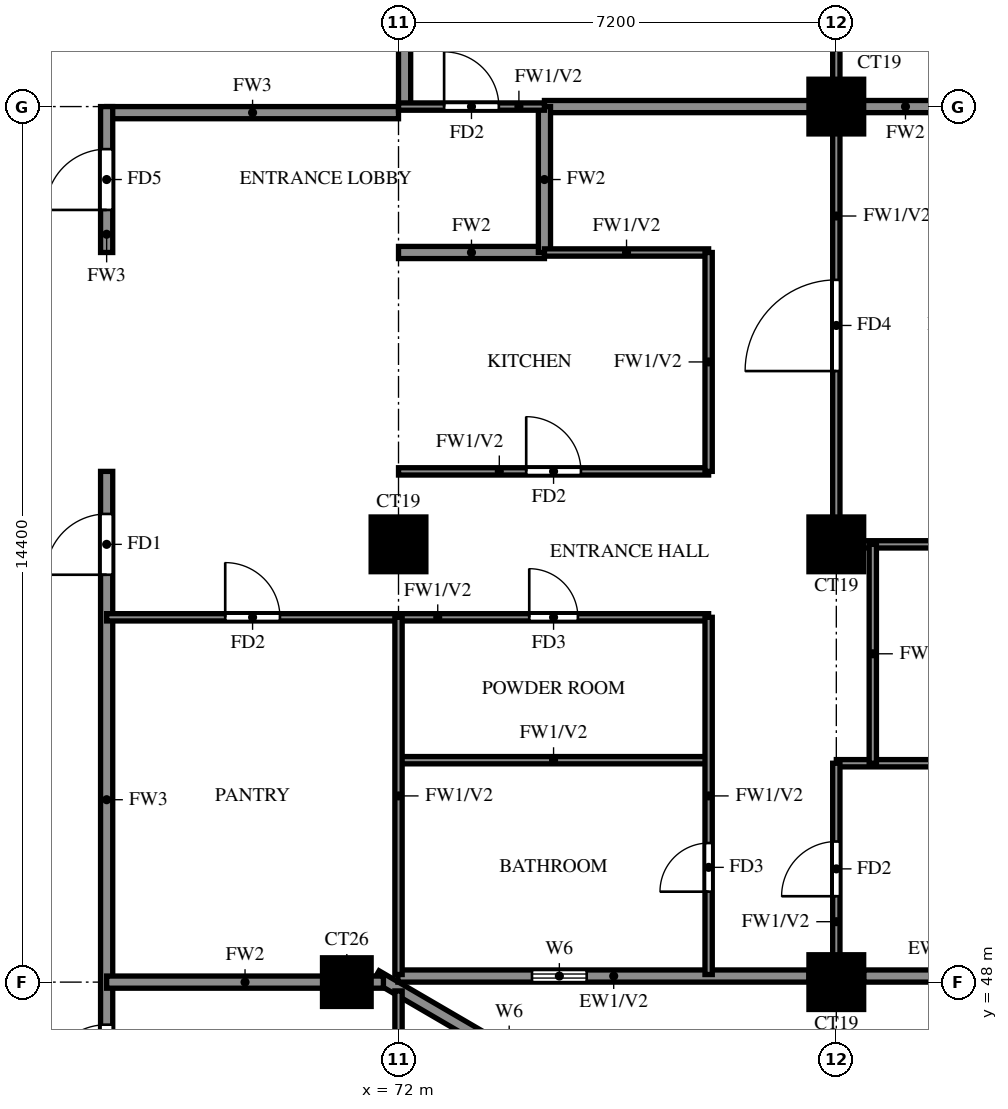
"""IFC4 building model, lengths in metres.
Left out: names, types, materials, properties, quantities, classifications, styles, units other than length and angle.
Written with IfcOpenShell. Run it as: python <this file> out.ifc"""

import sys

from ifc_helpers import new_model, si_unit, direction, frame, frame_2d, origin, origin_2d, place, context, subcontext, project, spatial, rectangle, extrude, source, transform, mapped, element, fill, save


model = new_model("IFC4")
c1 = context("Model", 3, precision=1e-05, world=origin(), true_north=direction((0.0, 1.0)))
c2 = subcontext(c1, "Body", "Model", "MODEL_VIEW")
j1 = project(units=[si_unit("LENGTHUNIT", "METRE"), si_unit("PLANEANGLEUNIT", "RADIAN")], contexts=[c1])
p1 = place(None, origin())
s1 = spatial("IfcSite", under=j1, at=p1, CompositionType="ELEMENT")
p2 = place(p1, origin())
s2 = spatial("IfcBuilding", under=s1, at=p2, CompositionType="ELEMENT")
p3 = place(p2, frame((0.0, 0.0, 199.0)))
s3 = spatial("IfcBuildingStorey", under=s2, at=p3, CompositionType="ELEMENT", Elevation=199.0)
m1 = source(origin(), c2, "Body", "SweptSolid", [
    extrude(rectangle(XDim=0.8, YDim=0.8, at=origin_2d()), origin(), (0.0, 0.0, 1.0), 3.2),
])
p4 = place(p3, frame((71.15, 48.0, 0.0), z_axis=(0.0, 0.0, 1.0), x_axis=(1.0, 0.0, 0.0)))
e1 = element("IfcColumn", 1, at=p4, inside=s3, PredefinedType="COLUMN", context=c2, shape_type="MappedRepresentation", body=[
    mapped(m1, transform((0.0, 0.0, 0.0))),
])
m2 = source(origin(), c2, "Body", "SweptSolid", [
    extrude(rectangle(XDim=0.9, YDim=0.9, at=origin_2d()), origin(), (0.0, 0.0, 1.0), 3.2),
])
for number, where, z_axis, x_axis in (
    (2, (79.2, 48.0, 0.0), (0.0, 0.0, 1.0), (1.0, 0.0, 0.0)),
    (3, (72.0, 55.2, 0.0), (0.0, 0.0, 1.0), (1.0, 0.0, 0.0)),
    (4, (79.2, 55.2, 0.0), (0.0, 0.0, 1.0), (1.0, 0.0, 0.0)),
    (5, (79.2, 62.4, 0.0), (0.0, 0.0, 1.0), (1.0, 0.0, 0.0)),
):
    element("IfcColumn", number, at=place(p3, frame(where, z_axis=z_axis, x_axis=x_axis)), inside=s3, PredefinedType="COLUMN", context=c2, shape_type="MappedRepresentation", body=[
        mapped(m2, transform((0.0, 0.0, 0.0))),
    ])
p5 = place(p3, frame((85.719, 39.881, 0.0), z_axis=(0.0, 0.0, 1.0), x_axis=(-0.86377618652, 0.503875678716, 0.0)))
e6 = element("IfcWall", 6, at=p5, inside=s3, PredefinedType="SOLIDWALL", context=c2, shape_type="SweptSolid", body=[
    extrude(rectangle(XDim=16.311, YDim=0.2, at=frame_2d((8.156, 0.0))), origin(), (0.0, 0.0, 1.0), 3.2),
])
p6 = place(p5, frame((13.326, 0.0, 1.5)))
e7 = element("IfcOpeningElement", 7, at=p6, cuts=e6, PredefinedType="OPENING", context=c2, shape_type="SweptSolid", body=[
    extrude(rectangle(XDim=0.9, YDim=0.9, at=frame_2d((0.45, 0.45))), frame((0.0, 0.11, 0.0), z_axis=(0.0, -1.0, 0.0), x_axis=(1.0, 0.0, 0.0)), (0.0, 0.0, 1.0), 0.22),
])
p7 = place(p3, frame((71.99, 48.1, 0.0), z_axis=(0.0, 0.0, 1.0), x_axis=(1.0, 0.0, 0.0)))
e8 = element("IfcWall", 8, at=p7, inside=s3, PredefinedType="SOLIDWALL", context=c2, shape_type="SweptSolid", body=[
    extrude(rectangle(XDim=6.76, YDim=0.2, at=frame_2d((3.38, 0.0))), origin(), (0.0, 0.0, 1.0), 3.2),
])
p8 = place(p7, frame((2.205, 0.0, 1.5)))
e9 = element("IfcOpeningElement", 9, at=p8, cuts=e8, PredefinedType="OPENING", context=c2, shape_type="SweptSolid", body=[
    extrude(rectangle(XDim=0.9, YDim=0.9, at=frame_2d((0.45, 0.45))), frame((0.0, 0.11, 0.0), z_axis=(0.0, -1.0, 0.0), x_axis=(1.0, 0.0, 0.0)), (0.0, 0.0, 1.0), 0.22),
])
p9 = place(p3, frame((79.65, 48.1, 0.0), z_axis=(0.0, 0.0, 1.0), x_axis=(1.0, 0.0, 0.0)))
e10 = element("IfcWall", 10, at=p9, inside=s3, PredefinedType="SOLIDWALL", context=c2, shape_type="SweptSolid", body=[
    extrude(rectangle(XDim=5.75, YDim=0.2, at=frame_2d((2.875, 0.0))), origin(), (0.0, 0.0, 1.0), 3.2),
])
p10 = place(p9, frame((1.675, 0.0, 0.6)))
e11 = element("IfcOpeningElement", 11, at=p10, cuts=e10, PredefinedType="OPENING", context=c2, shape_type="SweptSolid", body=[
    extrude(rectangle(XDim=2.4, YDim=2.4, at=frame_2d((1.2, 1.2))), frame((0.0, 0.11, 0.0), z_axis=(0.0, -1.0, 0.0), x_axis=(1.0, 0.0, 0.0)), (0.0, 0.0, 1.0), 0.22),
])
p11 = place(p3, frame((67.2, 62.3, 0.0), z_axis=(0.0, 0.0, 1.0), x_axis=(1.0, 0.0, 0.0)))
e12 = element("IfcWall", 12, at=p11, inside=s3, PredefinedType="SOLIDWALL", context=c2, shape_type="SweptSolid", body=[
    extrude(rectangle(XDim=4.8, YDim=0.2, at=frame_2d((2.4, 0.0))), origin(), (0.0, 0.0, 1.0), 3.2),
])
p12 = place(p3, frame((67.2, 45.6, 0.0), z_axis=(0.0, 0.0, 1.0), x_axis=(0.0, 1.0, 0.0)))
e13 = element("IfcWall", 13, at=p12, inside=s3, PredefinedType="SOLIDWALL", context=c2, shape_type="SweptSolid", body=[
    extrude(rectangle(XDim=10.8, YDim=0.2, at=frame_2d((5.4, 0.0))), origin(), (0.0, 0.0, 1.0), 3.2),
])
p13 = place(p12, frame((9.1, 0.0, 0.0)))
e14 = element("IfcOpeningElement", 14, at=p13, cuts=e13, PredefinedType="OPENING", context=c2, shape_type="SweptSolid", body=[
    extrude(rectangle(XDim=1.0, YDim=2.1, at=frame_2d((0.5, 1.05))), frame((0.0, 0.11, 0.0), z_axis=(0.0, -1.0, 0.0), x_axis=(1.0, 0.0, 0.0)), (0.0, 0.0, 1.0), 0.22),
])
p14 = place(p12, frame((0.7, 0.0, 0.0)))
e15 = element("IfcOpeningElement", 15, at=p14, cuts=e13, PredefinedType="OPENING", context=c2, shape_type="SweptSolid", body=[
    extrude(rectangle(XDim=1.0, YDim=2.1, at=frame_2d((0.5, 1.05))), frame((0.0, 0.11, 0.0), z_axis=(0.0, -1.0, 0.0), x_axis=(1.0, 0.0, 0.0)), (0.0, 0.0, 1.0), 0.22),
])
p15 = place(p3, frame((67.2, 60.0, 0.0), z_axis=(0.0, 0.0, 1.0), x_axis=(0.0, 1.0, 0.0)))
e16 = element("IfcWall", 16, at=p15, inside=s3, PredefinedType="SOLIDWALL", context=c2, shape_type="SweptSolid", body=[
    extrude(rectangle(XDim=2.4, YDim=0.2, at=frame_2d((1.2, 0.0))), origin(), (0.0, 0.0, 1.0), 3.2),
])
p16 = place(p15, frame((0.7, 0.0, 0.0)))
e17 = element("IfcOpeningElement", 17, at=p16, cuts=e16, PredefinedType="OPENING", context=c2, shape_type="SweptSolid", body=[
    extrude(rectangle(XDim=1.0, YDim=2.1, at=frame_2d((0.5, 1.05))), frame((0.0, 0.11, 0.0), z_axis=(0.0, -1.0, 0.0), x_axis=(1.0, 0.0, 0.0)), (0.0, 0.0, 1.0), 0.22),
])
p17 = place(p3, frame((72.1, 62.4, 0.0), z_axis=(0.0, 0.0, 1.0), x_axis=(0.0, 1.0, 0.0)))
e18 = element("IfcWall", 18, at=p17, inside=s3, PredefinedType="SOLIDWALL", context=c2, shape_type="SweptSolid", body=[
    extrude(rectangle(XDim=15.6, YDim=0.2, at=frame_2d((7.8, 0.0))), origin(), (0.0, 0.0, 1.0), 3.2),
])
p18 = place(p3, frame((67.2, 48.0, 0.0), z_axis=(0.0, 0.0, 1.0), x_axis=(1.0, 0.0, 0.0)))
e19 = element("IfcWall", 19, at=p18, inside=s3, PredefinedType="SOLIDWALL", context=c2, shape_type="SweptSolid", body=[
    extrude(rectangle(XDim=4.552, YDim=0.2, at=frame_2d((2.276, 0.0))), origin(), (0.0, 0.0, 1.0), 3.2),
])
p19 = place(p3, frame((72.0, 60.0, 0.0), z_axis=(0.0, 0.0, 1.0), x_axis=(1.0, 0.0, 0.0)))
e20 = element("IfcWall", 20, at=p19, inside=s3, PredefinedType="SOLIDWALL", context=c2, shape_type="SweptSolid", body=[
    extrude(rectangle(XDim=2.4, YDim=0.2, at=frame_2d((1.2, 0.0))), origin(), (0.0, 0.0, 1.0), 3.2),
])
p20 = place(p3, frame((74.4, 62.4, 0.0), z_axis=(0.0, 0.0, 1.0), x_axis=(1.0, 0.0, 0.0)))
e21 = element("IfcWall", 21, at=p20, inside=s3, PredefinedType="SOLIDWALL", context=c2, shape_type="SweptSolid", body=[
    extrude(rectangle(XDim=11.875, YDim=0.2, at=frame_2d((5.938, 0.0))), origin(), (0.0, 0.0, 1.0), 3.2),
])
p21 = place(p3, frame((74.4, 60.0, 0.0), z_axis=(0.0, 0.0, 1.0), x_axis=(0.0, 1.0, 0.0)))
e22 = element("IfcWall", 22, at=p21, inside=s3, PredefinedType="SOLIDWALL", context=c2, shape_type="SweptSolid", body=[
    extrude(rectangle(XDim=2.4, YDim=0.2, at=frame_2d((1.2, 0.0))), origin(), (0.0, 0.0, 1.0), 3.2),
])
p22 = place(p3, frame((79.2, 51.6, 0.0), z_axis=(0.0, 0.0, 1.0), x_axis=(1.0, 0.0, 0.0)))
e23 = element("IfcWall", 23, at=p22, inside=s3, PredefinedType="PARTITIONING", context=c2, shape_type="SweptSolid", body=[
    extrude(rectangle(XDim=7.075, YDim=0.12, at=frame_2d((3.538, 0.0))), origin(), (0.0, 0.0, 1.0), 2.3),
])
p23 = place(p22, frame((3.438, 0.0, 0.0)))
e24 = element("IfcOpeningElement", 24, at=p23, cuts=e23, PredefinedType="OPENING", context=c2, shape_type="SweptSolid", body=[
    extrude(rectangle(XDim=0.8, YDim=2.1, at=frame_2d((0.4, 1.05))), frame((0.0, 0.07, 0.0), z_axis=(0.0, -1.0, 0.0), x_axis=(1.0, 0.0, 0.0)), (0.0, 0.0, 1.0), 0.14),
])
p24 = place(p3, frame((72.0, 51.65, 0.0), z_axis=(0.0, 0.0, 1.0), x_axis=(1.0, 0.0, 0.0)))
e25 = element("IfcWall", 25, at=p24, inside=s3, PredefinedType="PARTITIONING", context=c2, shape_type="SweptSolid", body=[
    extrude(rectangle(XDim=5.1, YDim=0.12, at=frame_2d((2.55, 0.0))), origin(), (0.0, 0.0, 1.0), 3.2),
])
p25 = place(p3, frame((67.2, 54.0, 0.0), z_axis=(0.0, 0.0, 1.0), x_axis=(1.0, 0.0, 0.0)))
e26 = element("IfcWall", 26, at=p25, inside=s3, PredefinedType="PARTITIONING", context=c2, shape_type="SweptSolid", body=[
    extrude(rectangle(XDim=9.9, YDim=0.12, at=frame_2d((4.95, 0.0))), origin(), (0.0, 0.0, 1.0), 3.2),
])
p26 = place(p25, frame((6.95, 0.0, 0.0)))
e27 = element("IfcOpeningElement", 27, at=p26, cuts=e26, PredefinedType="OPENING", context=c2, shape_type="SweptSolid", body=[
    extrude(rectangle(XDim=0.8, YDim=2.1, at=frame_2d((0.4, 1.05))), frame((0.0, 0.07, 0.0), z_axis=(0.0, -1.0, 0.0), x_axis=(1.0, 0.0, 0.0)), (0.0, 0.0, 1.0), 0.14),
])
p27 = place(p25, frame((1.95, 0.0, 0.0)))
e28 = element("IfcOpeningElement", 28, at=p27, cuts=e26, PredefinedType="OPENING", context=c2, shape_type="SweptSolid", body=[
    extrude(rectangle(XDim=0.9, YDim=2.1, at=frame_2d((0.45, 1.05))), frame((0.0, 0.07, 0.0), z_axis=(0.0, -1.0, 0.0), x_axis=(1.0, 0.0, 0.0)), (0.0, 0.0, 1.0), 0.14),
])
p28 = place(p3, frame((79.2, 55.2, 0.0), z_axis=(0.0, 0.0, 1.0), x_axis=(1.0, 0.0, 0.0)))
e29 = element("IfcWall", 29, at=p28, inside=s3, PredefinedType="PARTITIONING", context=c2, shape_type="SweptSolid", body=[
    extrude(rectangle(XDim=7.075, YDim=0.12, at=frame_2d((3.538, 0.0))), origin(), (0.0, 0.0, 1.0), 3.2),
])
p29 = place(p3, frame((72.0, 56.4, 0.0), z_axis=(0.0, 0.0, 1.0), x_axis=(1.0, 0.0, 0.0)))
e30 = element("IfcWall", 30, at=p29, inside=s3, PredefinedType="PARTITIONING", context=c2, shape_type="SweptSolid", body=[
    extrude(rectangle(XDim=5.1, YDim=0.12, at=frame_2d((2.55, 0.0))), origin(), (0.0, 0.0, 1.0), 3.2),
])
p30 = place(p29, frame((2.1, 0.0, 0.0)))
e31 = element("IfcOpeningElement", 31, at=p30, cuts=e30, PredefinedType="OPENING", context=c2, shape_type="SweptSolid", body=[
    extrude(rectangle(XDim=0.9, YDim=2.1, at=frame_2d((0.45, 1.05))), frame((0.0, 0.07, 0.0), z_axis=(0.0, -1.0, 0.0), x_axis=(1.0, 0.0, 0.0)), (0.0, 0.0, 1.0), 0.14),
])
p31 = place(p3, frame((74.4, 60.0, 0.0), z_axis=(0.0, 0.0, 1.0), x_axis=(1.0, 0.0, 0.0)))
e32 = element("IfcWall", 32, at=p31, inside=s3, PredefinedType="PARTITIONING", context=c2, shape_type="SweptSolid", body=[
    extrude(rectangle(XDim=2.7, YDim=0.12, at=frame_2d((1.35, 0.0))), origin(), (0.0, 0.0, 1.0), 3.2),
])
p32 = place(p3, frame((72.0, 62.4, 0.0), z_axis=(0.0, 0.0, 1.0), x_axis=(1.0, 0.0, 0.0)))
e33 = element("IfcWall", 33, at=p32, inside=s3, PredefinedType="PARTITIONING", context=c2, shape_type="SweptSolid", body=[
    extrude(rectangle(XDim=2.4, YDim=0.12, at=frame_2d((1.2, 0.0))), origin(), (0.0, 0.0, 1.0), 3.2),
])
p33 = place(p32, frame((0.75, 0.0, 0.0)))
e34 = element("IfcOpeningElement", 34, at=p33, cuts=e33, PredefinedType="OPENING", context=c2, shape_type="SweptSolid", body=[
    extrude(rectangle(XDim=0.9, YDim=2.1, at=frame_2d((0.45, 1.05))), frame((0.0, 0.07, 0.0), z_axis=(0.0, -1.0, 0.0), x_axis=(1.0, 0.0, 0.0)), (0.0, 0.0, 1.0), 0.14),
])
p34 = place(p3, frame((72.0, 39.725, 0.0), z_axis=(0.0, 0.0, 1.0), x_axis=(0.0, 1.0, 0.0)))
e35 = element("IfcWall", 35, at=p34, inside=s3, PredefinedType="PARTITIONING", context=c2, shape_type="SweptSolid", body=[
    extrude(rectangle(XDim=8.13, YDim=0.12, at=frame_2d((4.065, 0.0))), origin(), (0.0, 0.0, 1.0), 2.3),
])
p35 = place(p34, frame((1.788, 0.0, 0.0)))
e36 = element("IfcOpeningElement", 36, at=p35, cuts=e35, PredefinedType="OPENING", context=c2, shape_type="SweptSolid", body=[
    extrude(rectangle(XDim=1.5, YDim=2.1, at=frame_2d((0.75, 1.05))), frame((0.0, 0.07, 0.0), z_axis=(0.0, -1.0, 0.0), x_axis=(1.0, 0.0, 0.0)), (0.0, 0.0, 1.0), 0.14),
])
p36 = place(p34, frame((4.575, 0.0, 0.0)))
e37 = element("IfcOpeningElement", 37, at=p36, cuts=e35, PredefinedType="OPENING", context=c2, shape_type="SweptSolid", body=[
    extrude(rectangle(XDim=0.8, YDim=2.1, at=frame_2d((0.4, 1.05))), frame((0.0, 0.07, 0.0), z_axis=(0.0, -1.0, 0.0), x_axis=(1.0, 0.0, 0.0)), (0.0, 0.0, 1.0), 0.14),
])
p37 = place(p3, frame((72.0, 48.125, 0.0), z_axis=(0.0, 0.0, 1.0), x_axis=(0.0, 1.0, 0.0)))
e38 = element("IfcWall", 38, at=p37, inside=s3, PredefinedType="PARTITIONING", context=c2, shape_type="SweptSolid", body=[
    extrude(rectangle(XDim=5.875, YDim=0.12, at=frame_2d((2.938, 0.0))), origin(), (0.0, 0.0, 1.0), 3.2),
])
p38 = place(p3, frame((77.1, 48.125, 0.0), z_axis=(0.0, 0.0, 1.0), x_axis=(0.0, 1.0, 0.0)))
e39 = element("IfcWall", 39, at=p38, inside=s3, PredefinedType="PARTITIONING", context=c2, shape_type="SweptSolid", body=[
    extrude(rectangle(XDim=5.875, YDim=0.12, at=frame_2d((2.938, 0.0))), origin(), (0.0, 0.0, 1.0), 3.2),
])
p39 = place(p38, frame((1.363, 0.0, 0.0)))
e40 = element("IfcOpeningElement", 40, at=p39, cuts=e39, PredefinedType="OPENING", context=c2, shape_type="SweptSolid", body=[
    extrude(rectangle(XDim=0.8, YDim=2.1, at=frame_2d((0.4, 1.05))), frame((0.0, 0.07, 0.0), z_axis=(0.0, -1.0, 0.0), x_axis=(1.0, 0.0, 0.0)), (0.0, 0.0, 1.0), 0.14),
])
p40 = place(p3, frame((77.1, 56.4, 0.0), z_axis=(0.0, 0.0, 1.0), x_axis=(0.0, 1.0, 0.0)))
e41 = element("IfcWall", 41, at=p40, inside=s3, PredefinedType="PARTITIONING", context=c2, shape_type="SweptSolid", body=[
    extrude(rectangle(XDim=3.6, YDim=0.12, at=frame_2d((1.8, 0.0))), origin(), (0.0, 0.0, 1.0), 3.2),
])
p41 = place(p3, frame((79.2, 48.125, 0.0), z_axis=(0.0, 0.0, 1.0), x_axis=(0.0, 1.0, 0.0)))
e42 = element("IfcWall", 42, at=p41, inside=s3, PredefinedType="PARTITIONING", context=c2, shape_type="SweptSolid", body=[
    extrude(rectangle(XDim=3.475, YDim=0.12, at=frame_2d((1.738, 0.0))), origin(), (0.0, 0.0, 1.0), 3.2),
])
p42 = place(p41, frame((1.288, 0.0, 0.0)))
e43 = element("IfcOpeningElement", 43, at=p42, cuts=e42, PredefinedType="OPENING", context=c2, shape_type="SweptSolid", body=[
    extrude(rectangle(XDim=0.9, YDim=2.1, at=frame_2d((0.45, 1.05))), frame((0.0, 0.07, 0.0), z_axis=(0.0, -1.0, 0.0), x_axis=(1.0, 0.0, 0.0)), (0.0, 0.0, 1.0), 0.14),
])
p43 = place(p3, frame((79.2, 55.2, 0.0), z_axis=(0.0, 0.0, 1.0), x_axis=(0.0, 1.0, 0.0)))
e44 = element("IfcWall", 44, at=p43, inside=s3, PredefinedType="PARTITIONING", context=c2, shape_type="SweptSolid", body=[
    extrude(rectangle(XDim=10.8, YDim=0.12, at=frame_2d((5.4, 0.0))), origin(), (0.0, 0.0, 1.0), 3.2),
])
p44 = place(p43, frame((2.85, 0.0, 0.0)))
e45 = element("IfcOpeningElement", 45, at=p44, cuts=e44, PredefinedType="OPENING", context=c2, shape_type="SweptSolid", body=[
    extrude(rectangle(XDim=1.5, YDim=2.1, at=frame_2d((0.75, 1.05))), frame((0.0, 0.07, 0.0), z_axis=(0.0, -1.0, 0.0), x_axis=(1.0, 0.0, 0.0)), (0.0, 0.0, 1.0), 0.14),
])
p45 = place(p43, frame((8.55, 0.0, 0.0)))
e46 = element("IfcOpeningElement", 46, at=p45, cuts=e44, PredefinedType="OPENING", context=c2, shape_type="SweptSolid", body=[
    extrude(rectangle(XDim=0.9, YDim=2.1, at=frame_2d((0.45, 1.05))), frame((0.0, 0.07, 0.0), z_axis=(0.0, -1.0, 0.0), x_axis=(1.0, 0.0, 0.0)), (0.0, 0.0, 1.0), 0.14),
])
p46 = place(p3, frame((79.8, 51.6, 0.0), z_axis=(0.0, 0.0, 1.0), x_axis=(0.0, 1.0, 0.0)))
e47 = element("IfcWall", 47, at=p46, inside=s3, PredefinedType="PARTITIONING", context=c2, shape_type="SweptSolid", body=[
    extrude(rectangle(XDim=3.6, YDim=0.12, at=frame_2d((1.8, 0.0))), origin(), (0.0, 0.0, 1.0), 3.2),
])
p47 = place(p8, origin())
e48 = element("IfcWindow", 48, at=p47, inside=s3, PartitioningType="SINGLE_PANEL", PredefinedType="WINDOW", context=c2, shape_type="SweptSolid", body=[
    extrude(rectangle(XDim=0.9, YDim=0.9, at=frame_2d((0.45, 0.45))), frame((0.0, 0.03, 0.0), z_axis=(0.0, -1.0, 0.0), x_axis=(1.0, 0.0, 0.0)), (0.0, 0.0, 1.0), 0.06),
])
fill(e9, e48)
p48 = place(p13, origin())
e49 = element("IfcDoor", 49, at=p48, inside=s3, OperationType="SINGLE_SWING_LEFT", PredefinedType="DOOR", context=c2, shape_type="SweptSolid", body=[
    extrude(rectangle(XDim=1.0, YDim=2.1, at=frame_2d((0.5, 1.05))), frame((0.0, 0.025, 0.0), z_axis=(0.0, -1.0, 0.0), x_axis=(1.0, 0.0, 0.0)), (0.0, 0.0, 1.0), 0.05),
])
fill(e14, e49)
p49 = place(p42, origin())
e50 = element("IfcDoor", 50, at=p49, inside=s3, OperationType="SINGLE_SWING_RIGHT", PredefinedType="DOOR", context=c2, shape_type="SweptSolid", body=[
    extrude(rectangle(XDim=0.9, YDim=2.1, at=frame_2d((0.45, 1.05))), frame((0.0, 0.025, 0.0), z_axis=(0.0, -1.0, 0.0), x_axis=(1.0, 0.0, 0.0)), (0.0, 0.0, 1.0), 0.05),
])
fill(e43, e50)
p50 = place(p44, origin())
e51 = element("IfcDoor", 51, at=p50, inside=s3, OperationType="SINGLE_SWING_LEFT", PredefinedType="DOOR", context=c2, shape_type="SweptSolid", body=[
    extrude(rectangle(XDim=1.5, YDim=2.1, at=frame_2d((0.75, 1.05))), frame((0.0, 0.025, 0.0), z_axis=(0.0, -1.0, 0.0), x_axis=(1.0, 0.0, 0.0)), (0.0, 0.0, 1.0), 0.05),
])
fill(e45, e51)
p51 = place(p39, origin())
e52 = element("IfcDoor", 52, at=p51, inside=s3, OperationType="SINGLE_SWING_RIGHT", PredefinedType="DOOR", context=c2, shape_type="SweptSolid", body=[
    extrude(rectangle(XDim=0.8, YDim=2.1, at=frame_2d((0.4, 1.05))), frame((0.0, 0.025, 0.0), z_axis=(0.0, -1.0, 0.0), x_axis=(1.0, 0.0, 0.0)), (0.0, 0.0, 1.0), 0.05),
])
fill(e40, e52)
p52 = place(p26, origin())
e53 = element("IfcDoor", 53, at=p52, inside=s3, OperationType="SINGLE_SWING_LEFT", PredefinedType="DOOR", context=c2, shape_type="SweptSolid", body=[
    extrude(rectangle(XDim=0.8, YDim=2.1, at=frame_2d((0.4, 1.05))), frame((0.0, 0.025, 0.0), z_axis=(0.0, -1.0, 0.0), x_axis=(1.0, 0.0, 0.0)), (0.0, 0.0, 1.0), 0.05),
])
fill(e27, e53)
p53 = place(p30, origin())
e54 = element("IfcDoor", 54, at=p53, inside=s3, OperationType="SINGLE_SWING_LEFT", PredefinedType="DOOR", context=c2, shape_type="SweptSolid", body=[
    extrude(rectangle(XDim=0.9, YDim=2.1, at=frame_2d((0.45, 1.05))), frame((0.0, 0.025, 0.0), z_axis=(0.0, -1.0, 0.0), x_axis=(1.0, 0.0, 0.0)), (0.0, 0.0, 1.0), 0.05),
])
fill(e31, e54)
p54 = place(p27, origin())
e55 = element("IfcDoor", 55, at=p54, inside=s3, OperationType="SINGLE_SWING_RIGHT", PredefinedType="DOOR", context=c2, shape_type="SweptSolid", body=[
    extrude(rectangle(XDim=0.9, YDim=2.1, at=frame_2d((0.45, 1.05))), frame((0.0, 0.025, 0.0), z_axis=(0.0, -1.0, 0.0), x_axis=(1.0, 0.0, 0.0)), (0.0, 0.0, 1.0), 0.05),
])
fill(e28, e55)
p55 = place(p33, origin())
e56 = element("IfcDoor", 56, at=p55, inside=s3, OperationType="SINGLE_SWING_RIGHT", PredefinedType="DOOR", context=c2, shape_type="SweptSolid", body=[
    extrude(rectangle(XDim=0.9, YDim=2.1, at=frame_2d((0.45, 1.05))), frame((0.0, 0.025, 0.0), z_axis=(0.0, -1.0, 0.0), x_axis=(1.0, 0.0, 0.0)), (0.0, 0.0, 1.0), 0.05),
])
fill(e34, e56)
p56 = place(p16, origin())
e57 = element("IfcDoor", 57, at=p56, inside=s3, OperationType="SINGLE_SWING_LEFT", PredefinedType="DOOR", context=c2, shape_type="SweptSolid", body=[
    extrude(rectangle(XDim=1.0, YDim=2.1, at=frame_2d((0.5, 1.05))), frame((0.0, 0.025, 0.0), z_axis=(0.0, -1.0, 0.0), x_axis=(1.0, 0.0, 0.0)), (0.0, 0.0, 1.0), 0.05),
])
fill(e17, e57)
p57 = place(p14, origin())
e58 = element("IfcDoor", 58, at=p57, inside=s3, OperationType="SINGLE_SWING_LEFT", PredefinedType="DOOR", context=c2, shape_type="SweptSolid", body=[
    extrude(rectangle(XDim=1.0, YDim=2.1, at=frame_2d((0.5, 1.05))), frame((0.0, 0.025, 0.0), z_axis=(0.0, -1.0, 0.0), x_axis=(1.0, 0.0, 0.0)), (0.0, 0.0, 1.0), 0.05),
])
fill(e15, e58)
save(model, sys.argv[1])
